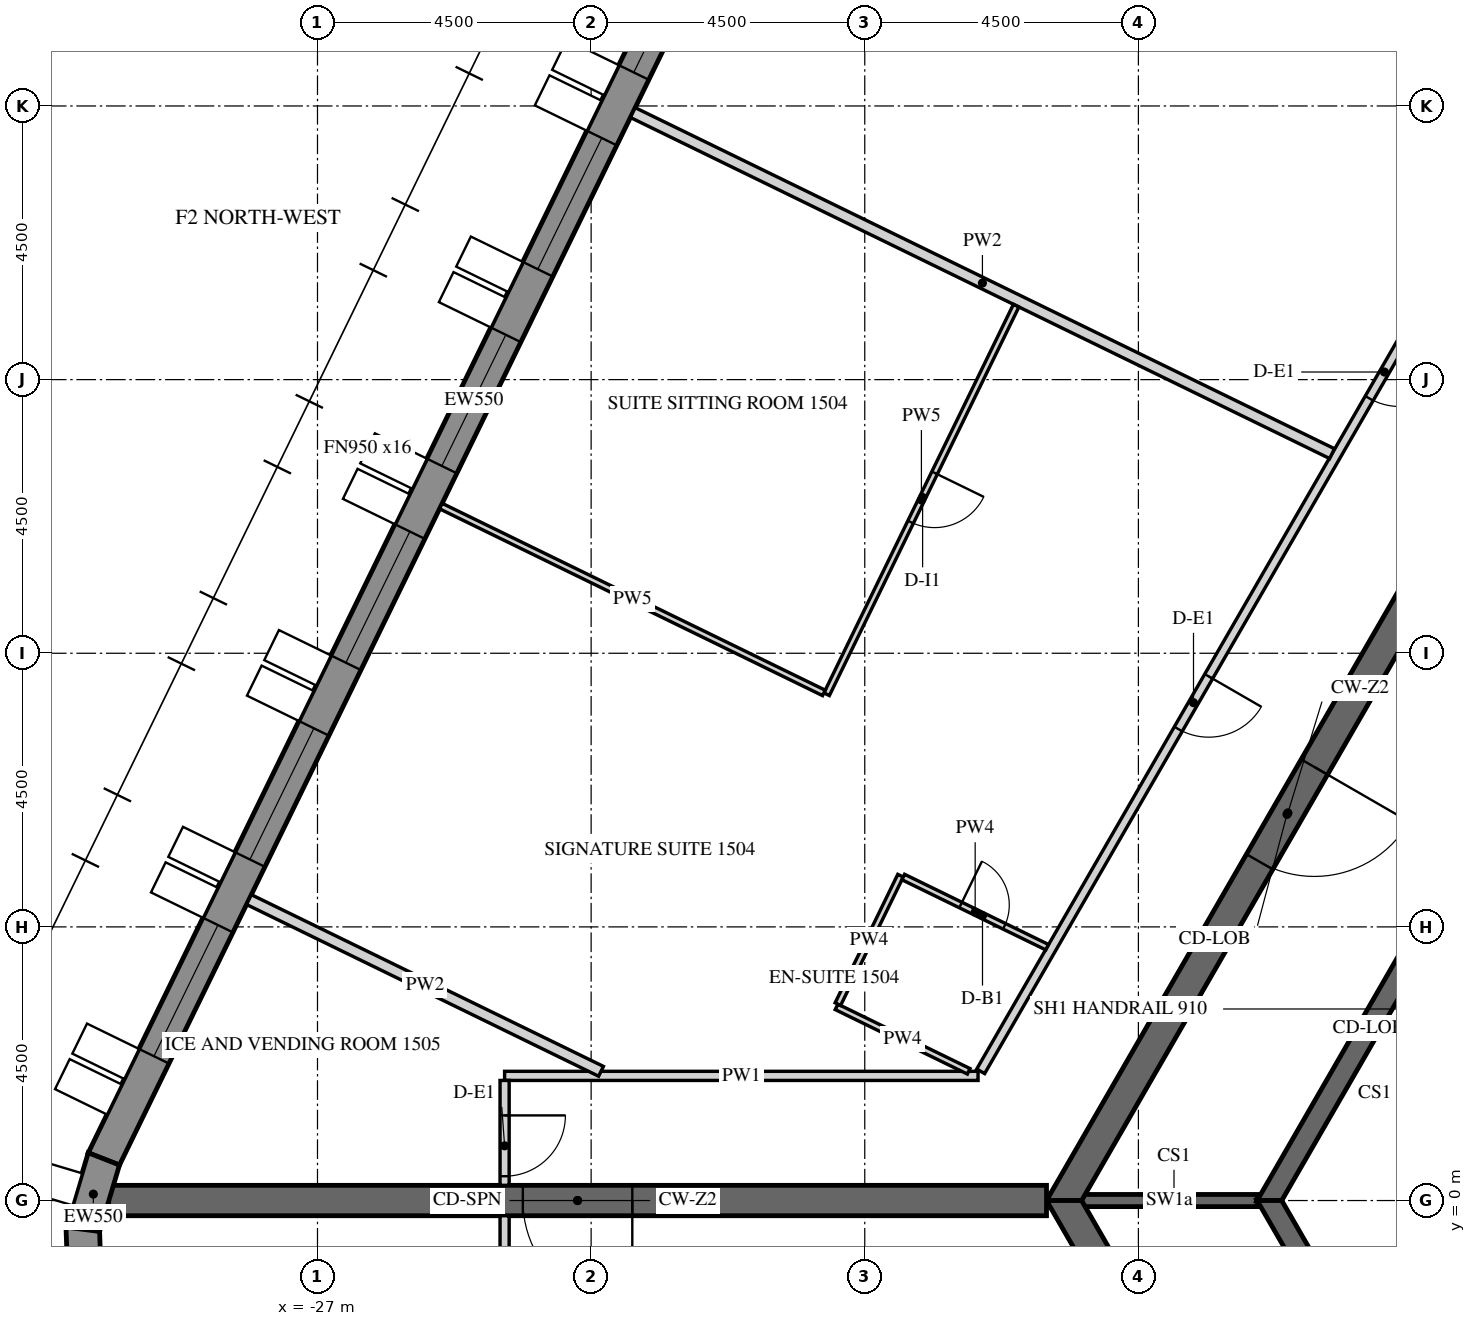
"""IFC4 building model, lengths in metres.
Left out: names, types, materials, properties, quantities, classifications, styles, units other than length and angle.
Written with IfcOpenShell. Run it as: python <this file> out.ifc"""

import sys

from ifc_helpers import new_model, si_unit, direction, frame, frame_2d, origin, place, context, subcontext, project, spatial, polyline, rectangle, outline, extrude, element, fill, save


model = new_model("IFC4")
c1 = context("Model", 3, precision=1e-05, world=origin(), true_north=direction((0.0, 1.0)))
c2 = subcontext(c1, "Body", "Model", "MODEL_VIEW")
j1 = project(units=[si_unit("LENGTHUNIT", "METRE"), si_unit("PLANEANGLEUNIT", "RADIAN")], contexts=[c1])
p1 = place(None, origin())
s1 = spatial("IfcSite", under=j1, at=p1, CompositionType="ELEMENT")
p2 = place(p1, origin())
s2 = spatial("IfcBuilding", under=s1, at=p2, CompositionType="ELEMENT")
p3 = place(p2, frame((0.0, 0.0, 195.6)))
s3 = spatial("IfcBuildingStorey", under=s2, at=p3, CompositionType="ELEMENT", Elevation=195.6)
p4 = place(p3, frame((-18.345, 25.633, -0.15), z_axis=(0.0, 0.0, 1.0), x_axis=(-0.43837181828, -0.898793718791, 0.0)))
e1 = element("IfcWall", 1, at=p4, inside=s3, PredefinedType="SOLIDWALL", context=c2, shape_type="SweptSolid", body=[
    extrude(outline(polyline([(-0.026, -0.275), (27.78, -0.275), (27.735, 0.275), (0.026, 0.275), (-0.026, -0.275)])), origin(), (0.0, 0.0, 1.0), 3.9),
])
p5 = place(p4, frame((1.879, 0.0, 1.05)))
e2 = element("IfcOpeningElement", 2, at=p5, cuts=e1, PredefinedType="OPENING", context=c2, shape_type="SweptSolid", body=[
    extrude(rectangle(XDim=2.4, YDim=2.4, at=frame_2d((1.2, 1.2))), frame((0.0, 0.285, 0.0), z_axis=(0.0, -1.0, 0.0), x_axis=(1.0, 0.0, 0.0)), (0.0, 0.0, 1.0), 0.57),
])
p6 = place(p4, frame((5.479, 0.0, 1.05)))
e3 = element("IfcOpeningElement", 3, at=p6, cuts=e1, PredefinedType="OPENING", context=c2, shape_type="SweptSolid", body=[
    extrude(rectangle(XDim=2.4, YDim=2.4, at=frame_2d((1.2, 1.2))), frame((0.0, 0.285, 0.0), z_axis=(0.0, -1.0, 0.0), x_axis=(1.0, 0.0, 0.0)), (0.0, 0.0, 1.0), 0.57),
])
p7 = place(p4, frame((9.079, 0.0, 1.05)))
e4 = element("IfcOpeningElement", 4, at=p7, cuts=e1, PredefinedType="OPENING", context=c2, shape_type="SweptSolid", body=[
    extrude(rectangle(XDim=2.4, YDim=2.4, at=frame_2d((1.2, 1.2))), frame((0.0, 0.285, 0.0), z_axis=(0.0, -1.0, 0.0), x_axis=(1.0, 0.0, 0.0)), (0.0, 0.0, 1.0), 0.57),
])
p8 = place(p4, frame((12.679, 0.0, 1.05)))
e5 = element("IfcOpeningElement", 5, at=p8, cuts=e1, PredefinedType="OPENING", context=c2, shape_type="SweptSolid", body=[
    extrude(rectangle(XDim=2.4, YDim=2.4, at=frame_2d((1.2, 1.2))), frame((0.0, 0.285, 0.0), z_axis=(0.0, -1.0, 0.0), x_axis=(1.0, 0.0, 0.0)), (0.0, 0.0, 1.0), 0.57),
])
p9 = place(p4, frame((16.279, 0.0, 1.05)))
e6 = element("IfcOpeningElement", 6, at=p9, cuts=e1, PredefinedType="OPENING", context=c2, shape_type="SweptSolid", body=[
    extrude(rectangle(XDim=2.4, YDim=2.4, at=frame_2d((1.2, 1.2))), frame((0.0, 0.285, 0.0), z_axis=(0.0, -1.0, 0.0), x_axis=(1.0, 0.0, 0.0)), (0.0, 0.0, 1.0), 0.57),
])
p10 = place(p4, frame((19.879, 0.0, 1.05)))
e7 = element("IfcOpeningElement", 7, at=p10, cuts=e1, PredefinedType="OPENING", context=c2, shape_type="SweptSolid", body=[
    extrude(rectangle(XDim=2.4, YDim=2.4, at=frame_2d((1.2, 1.2))), frame((0.0, 0.285, 0.0), z_axis=(0.0, -1.0, 0.0), x_axis=(1.0, 0.0, 0.0)), (0.0, 0.0, 1.0), 0.57),
])
p11 = place(p4, frame((23.479, 0.0, 1.05)))
e8 = element("IfcOpeningElement", 8, at=p11, cuts=e1, PredefinedType="OPENING", context=c2, shape_type="SweptSolid", body=[
    extrude(rectangle(XDim=2.4, YDim=2.4, at=frame_2d((1.2, 1.2))), frame((0.0, 0.285, 0.0), z_axis=(0.0, -1.0, 0.0), x_axis=(1.0, 0.0, 0.0)), (0.0, 0.0, 1.0), 0.57),
])
p12 = place(p3, frame((-30.513, 0.684, -0.15), z_axis=(0.0, 0.0, 1.0), x_axis=(-0.286736058109, -0.958009620505, 0.0)))
e9 = element("IfcWall", 9, at=p12, inside=s3, PredefinedType="SOLIDWALL", context=c2, shape_type="SweptSolid", body=[
    extrude(outline(polyline([(-0.022, -0.275), (1.253, -0.275), (1.163, 0.275), (0.022, 0.275), (-0.022, -0.275)])), origin(), (0.0, 0.0, 1.0), 3.9),
])
p13 = place(p3, frame((-30.86, -0.473, -0.15), z_axis=(0.0, 0.0, 1.0), x_axis=(0.03495638276, -0.999388838893, 0.0)))
e10 = element("IfcWall", 10, at=p13, inside=s3, PredefinedType="SOLIDWALL", context=c2, shape_type="SweptSolid", body=[
    extrude(outline(polyline([(-0.045, -0.275), (1.253, -0.275), (1.163, 0.275), (0.045, 0.275), (-0.045, -0.275)])), origin(), (0.0, 0.0, 1.0), 3.9),
])
p14 = place(p3, frame((-7.361, 12.75, -0.15), z_axis=(0.0, 0.0, 1.0), x_axis=(-0.50000571537, -0.866022103989, 0.0)))
e11 = element("IfcWall", 11, at=p14, inside=s3, PredefinedType="SHEAR", context=c2, shape_type="SweptSolid", body=[
    extrude(outline(polyline([(-0.144, -0.25), (14.867, -0.25), (14.578, 0.25), (0.144, 0.25), (-0.144, -0.25)])), origin(), (0.0, 0.0, 1.0), 3.9),
])
p15 = place(p14, frame((6.49, 0.0, 0.15)))
e12 = element("IfcOpeningElement", 12, at=p15, cuts=e11, PredefinedType="OPENING", context=c2, shape_type="SweptSolid", body=[
    extrude(rectangle(XDim=1.8, YDim=2.4, at=frame_2d((0.9, 1.2))), frame((0.0, 0.26, 0.0), z_axis=(0.0, -1.0, 0.0), x_axis=(1.0, 0.0, 0.0)), (0.0, 0.0, 1.0), 0.52),
])
p16 = place(p3, frame((-14.722, 0.0, -0.15), z_axis=(0.0, 0.0, 1.0), x_axis=(0.50000571537, -0.866022103989, 0.0)))
e13 = element("IfcWall", 13, at=p16, inside=s3, PredefinedType="SHEAR", context=c2, shape_type="SweptSolid", body=[
    extrude(outline(polyline([(-0.144, -0.25), (14.867, -0.25), (14.578, 0.25), (0.144, 0.25), (-0.144, -0.25)])), origin(), (0.0, 0.0, 1.0), 3.9),
])
p17 = place(p16, frame((6.432, 0.0, 0.15)))
e14 = element("IfcOpeningElement", 14, at=p17, cuts=e13, PredefinedType="OPENING", context=c2, shape_type="SweptSolid", body=[
    extrude(rectangle(XDim=1.8, YDim=2.4, at=frame_2d((0.9, 1.2))), frame((0.0, 0.26, 0.0), z_axis=(0.0, -1.0, 0.0), x_axis=(1.0, 0.0, 0.0)), (0.0, 0.0, 1.0), 0.52),
])
p18 = place(p3, frame((-15.011, 0.0, -0.15), z_axis=(0.0, 0.0, 1.0), x_axis=(-1.0, 0.0, 0.0)))
e15 = element("IfcWall", 15, at=p18, inside=s3, PredefinedType="SHEAR", context=c2, shape_type="SweptSolid", body=[
    extrude(rectangle(XDim=15.424, YDim=0.5, at=frame_2d((7.712, 0.0))), origin(), (0.0, 0.0, 1.0), 3.9),
])
p19 = place(p18, frame((6.812, 0.0, 0.15)))
e16 = element("IfcOpeningElement", 16, at=p19, cuts=e15, PredefinedType="OPENING", context=c2, shape_type="SweptSolid", body=[
    extrude(rectangle(XDim=1.8, YDim=2.4, at=frame_2d((0.9, 1.2))), frame((0.0, 0.26, 0.0), z_axis=(0.0, -1.0, 0.0), x_axis=(1.0, 0.0, 0.0)), (0.0, 0.0, 1.0), 0.52),
])
p20 = place(p3, frame((-5.673, 9.825, -0.15), z_axis=(0.0, 0.0, 1.0), x_axis=(-0.499995046907, -0.866028263435, 0.0)))
e17 = element("IfcWall", 17, at=p20, inside=s3, PredefinedType="SHEAR", context=c2, shape_type="SweptSolid", body=[
    extrude(outline(polyline([(-0.101, -0.175), (11.446, -0.175), (11.244, 0.175), (0.101, 0.175), (-0.101, -0.175)])), origin(), (0.0, 0.0, 1.0), 3.9),
])
p21 = place(p20, frame((4.801, 0.0, 0.15)))
e18 = element("IfcOpeningElement", 18, at=p21, cuts=e17, PredefinedType="OPENING", context=c2, shape_type="SweptSolid", body=[
    extrude(rectangle(XDim=1.8, YDim=2.4, at=frame_2d((0.9, 1.2))), frame((0.0, 0.185, 0.0), z_axis=(0.0, -1.0, 0.0), x_axis=(1.0, 0.0, 0.0)), (0.0, 0.0, 1.0), 0.37),
])
p22 = place(p3, frame((-11.345, 0.0, -0.15), z_axis=(0.0, 0.0, 1.0), x_axis=(0.499995046907, -0.866028263435, 0.0)))
e19 = element("IfcWall", 19, at=p22, inside=s3, PredefinedType="SHEAR", context=c2, shape_type="SweptSolid", body=[
    extrude(outline(polyline([(-0.101, -0.175), (11.446, -0.175), (11.244, 0.175), (0.101, 0.175), (-0.101, -0.175)])), origin(), (0.0, 0.0, 1.0), 3.9),
])
p23 = place(p22, frame((4.744, 0.0, 0.15)))
e20 = element("IfcOpeningElement", 20, at=p23, cuts=e19, PredefinedType="OPENING", context=c2, shape_type="SweptSolid", body=[
    extrude(rectangle(XDim=1.8, YDim=2.4, at=frame_2d((0.9, 1.2))), frame((0.0, 0.185, 0.0), z_axis=(0.0, -1.0, 0.0), x_axis=(1.0, 0.0, 0.0)), (0.0, 0.0, 1.0), 0.37),
])
p24 = place(p3, frame((-11.547, 0.0, -0.15), z_axis=(0.0, 0.0, 1.0), x_axis=(-1.0, 0.0, 0.0)))
e21 = element("IfcWall", 21, at=p24, inside=s3, PredefinedType="SHEAR", context=c2, shape_type="SweptSolid", body=[
    extrude(rectangle(XDim=2.887, YDim=0.2, at=frame_2d((1.443, 0.0))), origin(), (0.0, 0.0, 1.0), 3.9),
])
p25 = place(p3, frame((-8.704, 14.925, 0.0), z_axis=(0.0, 0.0, 1.0), x_axis=(-0.500001272756, -0.866024668957, 0.0)))
e22 = element("IfcWall", 22, at=p25, inside=s3, PredefinedType="PARTITIONING", context=c2, shape_type="SweptSolid", body=[
    extrude(rectangle(XDim=14.78, YDim=0.15, at=frame_2d((7.39, 0.0))), origin(), (0.0, 0.0, 1.0), 2.988),
])
p26 = place(p25, frame((1.001, 0.0, 0.0)))
e23 = element("IfcOpeningElement", 23, at=p26, cuts=e22, PredefinedType="OPENING", context=c2, shape_type="SweptSolid", body=[
    extrude(rectangle(XDim=1.0, YDim=2.1, at=frame_2d((0.5, 1.05))), frame((0.0, 0.085, 0.0), z_axis=(0.0, -1.0, 0.0), x_axis=(1.0, 0.0, 0.0)), (0.0, 0.0, 1.0), 0.17),
])
p27 = place(p25, frame((7.281, 0.0, 0.0)))
e24 = element("IfcOpeningElement", 24, at=p27, cuts=e22, PredefinedType="OPENING", context=c2, shape_type="SweptSolid", body=[
    extrude(rectangle(XDim=1.0, YDim=2.1, at=frame_2d((0.5, 1.05))), frame((0.0, 0.085, 0.0), z_axis=(0.0, -1.0, 0.0), x_axis=(1.0, 0.0, 0.0)), (0.0, 0.0, 1.0), 0.17),
])
p28 = place(p3, frame((-16.137, 2.05, 0.0), z_axis=(0.0, 0.0, 1.0), x_axis=(-1.0, 0.0, 0.0)))
e25 = element("IfcWall", 25, at=p28, inside=s3, PredefinedType="PARTITIONING", context=c2, shape_type="SweptSolid", body=[
    extrude(rectangle(XDim=7.786, YDim=0.15, at=frame_2d((3.893, 0.0))), origin(), (0.0, 0.0, 1.0), 2.988),
])
p29 = place(p3, frame((-23.923, 1.975, 0.0), z_axis=(0.0, 0.0, 1.0), x_axis=(0.0, -1.0, 0.0)))
e26 = element("IfcWall", 26, at=p29, inside=s3, PredefinedType="PARTITIONING", context=c2, shape_type="SweptSolid", body=[
    extrude(rectangle(XDim=1.725, YDim=0.15, at=frame_2d((0.863, 0.0))), origin(), (0.0, 0.0, 1.0), 2.988),
])
p30 = place(p29, frame((0.575, 0.0, 0.0)))
e27 = element("IfcOpeningElement", 27, at=p30, cuts=e26, PredefinedType="OPENING", context=c2, shape_type="SweptSolid", body=[
    extrude(rectangle(XDim=1.0, YDim=2.1, at=frame_2d((0.5, 1.05))), frame((0.0, 0.085, 0.0), z_axis=(0.0, -1.0, 0.0), x_axis=(1.0, 0.0, 0.0)), (0.0, 0.0, 1.0), 0.17),
])
p31 = place(p3, frame((-23.923, -0.25, 0.0), z_axis=(0.0, 0.0, 1.0), x_axis=(0.0, -1.0, 0.0)))
e28 = element("IfcWall", 28, at=p31, inside=s3, PredefinedType="PARTITIONING", context=c2, shape_type="SweptSolid", body=[
    extrude(rectangle(XDim=1.8, YDim=0.15, at=frame_2d((0.9, 0.0))), origin(), (0.0, 0.0, 1.0), 2.988),
])
p32 = place(p3, frame((-21.815, 17.892, 0.0), z_axis=(0.0, 0.0, 1.0), x_axis=(0.898799253997, -0.438360469265, 0.0)))
e29 = element("IfcWall", 29, at=p32, inside=s3, PredefinedType="PARTITIONING", context=c2, shape_type="SweptSolid", body=[
    extrude(rectangle(XDim=12.794, YDim=0.18, at=frame_2d((6.397, 0.0))), origin(), (0.0, 0.0, 1.0), 2.988),
])
p33 = place(p3, frame((-16.291, 2.125, 0.0), z_axis=(0.0, 0.0, 1.0), x_axis=(-0.898785911157, 0.438387825909, 0.0)))
e30 = element("IfcWall", 30, at=p33, inside=s3, PredefinedType="PARTITIONING", context=c2, shape_type="SweptSolid", body=[
    extrude(rectangle(XDim=2.418, YDim=0.1, at=frame_2d((1.209, 0.0))), origin(), (0.0, 0.0, 1.0), 2.988),
])
p34 = place(p3, frame((-18.442, 3.23, 0.0), z_axis=(0.0, 0.0, 1.0), x_axis=(0.438339704034, 0.898809381275, 0.0)))
e31 = element("IfcWall", 31, at=p34, inside=s3, PredefinedType="PARTITIONING", context=c2, shape_type="SweptSolid", body=[
    extrude(rectangle(XDim=2.35, YDim=0.1, at=frame_2d((1.175, 0.0))), origin(), (0.0, 0.0, 1.0), 2.988),
])
p35 = place(p3, frame((-17.367, 5.32, 0.0), z_axis=(0.0, 0.0, 1.0), x_axis=(0.898798752769, -0.438361496965, 0.0)))
e32 = element("IfcWall", 32, at=p35, inside=s3, PredefinedType="PARTITIONING", context=c2, shape_type="SweptSolid", body=[
    extrude(rectangle(XDim=2.632, YDim=0.1, at=frame_2d((1.316, 0.0))), origin(), (0.0, 0.0, 1.0), 2.988),
])
p36 = place(p35, frame((1.05, 0.0, 0.0)))
e33 = element("IfcOpeningElement", 33, at=p36, cuts=e32, PredefinedType="OPENING", context=c2, shape_type="SweptSolid", body=[
    extrude(rectangle(XDim=0.8, YDim=2.1, at=frame_2d((0.4, 1.05))), frame((0.0, 0.06, 0.0), z_axis=(0.0, -1.0, 0.0), x_axis=(1.0, 0.0, 0.0)), (0.0, 0.0, 1.0), 0.12),
])
p37 = place(p3, frame((-15.51, 14.717, 0.0), z_axis=(0.0, 0.0, 1.0), x_axis=(-0.438387776054, -0.898785935475, 0.0)))
e34 = element("IfcWall", 34, at=p37, inside=s3, PredefinedType="PARTITIONING", context=c2, shape_type="SweptSolid", body=[
    extrude(rectangle(XDim=7.11, YDim=0.1, at=frame_2d((3.555, 0.0))), origin(), (0.0, 0.0, 1.0), 2.988),
])
p38 = place(p37, frame((3.06, 0.0, 0.0)))
e35 = element("IfcOpeningElement", 35, at=p38, cuts=e34, PredefinedType="OPENING", context=c2, shape_type="SweptSolid", body=[
    extrude(rectangle(XDim=0.9, YDim=2.1, at=frame_2d((0.45, 1.05))), frame((0.0, 0.06, 0.0), z_axis=(0.0, -1.0, 0.0), x_axis=(1.0, 0.0, 0.0)), (0.0, 0.0, 1.0), 0.12),
])
p39 = place(p3, frame((-18.672, 8.348, 0.0), z_axis=(0.0, 0.0, 1.0), x_axis=(-0.898793888698, 0.438371469919, 0.0)))
e36 = element("IfcWall", 36, at=p39, inside=s3, PredefinedType="PARTITIONING", context=c2, shape_type="SweptSolid", body=[
    extrude(rectangle(XDim=7.008, YDim=0.1, at=frame_2d((3.504, 0.0))), origin(), (0.0, 0.0, 1.0), 2.988),
])
p40 = place(p3, frame((-28.127, 4.949, 0.0), z_axis=(0.0, 0.0, 1.0), x_axis=(0.898795032868, -0.438369124017, 0.0)))
e37 = element("IfcWall", 37, at=p40, inside=s3, PredefinedType="PARTITIONING", context=c2, shape_type="SweptSolid", body=[
    extrude(rectangle(XDim=6.442, YDim=0.18, at=frame_2d((3.221, 0.0))), origin(), (0.0, 0.0, 1.0), 2.988),
])
p41 = place(p6, frame((0.0, 0.205, 0.0)))
e38 = element("IfcWindow", 38, at=p41, inside=s3, PartitioningType="DOUBLE_PANEL_VERTICAL", PredefinedType="WINDOW", context=c2, shape_type="SweptSolid", body=[
    extrude(rectangle(XDim=2.4, YDim=2.4, at=frame_2d((1.2, 1.2))), frame((0.0, 0.03, 0.0), z_axis=(0.0, -1.0, 0.0), x_axis=(1.0, 0.0, 0.0)), (0.0, 0.0, 1.0), 0.06),
])
fill(e3, e38)
p42 = place(p7, frame((0.0, 0.205, 0.0)))
e39 = element("IfcWindow", 39, at=p42, inside=s3, PartitioningType="DOUBLE_PANEL_VERTICAL", PredefinedType="WINDOW", context=c2, shape_type="SweptSolid", body=[
    extrude(rectangle(XDim=2.4, YDim=2.4, at=frame_2d((1.2, 1.2))), frame((0.0, 0.03, 0.0), z_axis=(0.0, -1.0, 0.0), x_axis=(1.0, 0.0, 0.0)), (0.0, 0.0, 1.0), 0.06),
])
fill(e4, e39)
p43 = place(p8, frame((0.0, 0.205, 0.0)))
e40 = element("IfcWindow", 40, at=p43, inside=s3, PartitioningType="DOUBLE_PANEL_VERTICAL", PredefinedType="WINDOW", context=c2, shape_type="SweptSolid", body=[
    extrude(rectangle(XDim=2.4, YDim=2.4, at=frame_2d((1.2, 1.2))), frame((0.0, 0.03, 0.0), z_axis=(0.0, -1.0, 0.0), x_axis=(1.0, 0.0, 0.0)), (0.0, 0.0, 1.0), 0.06),
])
fill(e5, e40)
p44 = place(p9, frame((0.0, 0.205, 0.0)))
e41 = element("IfcWindow", 41, at=p44, inside=s3, PartitioningType="DOUBLE_PANEL_VERTICAL", PredefinedType="WINDOW", context=c2, shape_type="SweptSolid", body=[
    extrude(rectangle(XDim=2.4, YDim=2.4, at=frame_2d((1.2, 1.2))), frame((0.0, 0.03, 0.0), z_axis=(0.0, -1.0, 0.0), x_axis=(1.0, 0.0, 0.0)), (0.0, 0.0, 1.0), 0.06),
])
fill(e6, e41)
p45 = place(p10, frame((0.0, 0.205, 0.0)))
e42 = element("IfcWindow", 42, at=p45, inside=s3, PartitioningType="DOUBLE_PANEL_VERTICAL", PredefinedType="WINDOW", context=c2, shape_type="SweptSolid", body=[
    extrude(rectangle(XDim=2.4, YDim=2.4, at=frame_2d((1.2, 1.2))), frame((0.0, 0.03, 0.0), z_axis=(0.0, -1.0, 0.0), x_axis=(1.0, 0.0, 0.0)), (0.0, 0.0, 1.0), 0.06),
])
fill(e7, e42)
p46 = place(p11, frame((0.0, 0.205, 0.0)))
e43 = element("IfcWindow", 43, at=p46, inside=s3, PartitioningType="DOUBLE_PANEL_VERTICAL", PredefinedType="WINDOW", context=c2, shape_type="SweptSolid", body=[
    extrude(rectangle(XDim=2.4, YDim=2.4, at=frame_2d((1.2, 1.2))), frame((0.0, 0.03, 0.0), z_axis=(0.0, -1.0, 0.0), x_axis=(1.0, 0.0, 0.0)), (0.0, 0.0, 1.0), 0.06),
])
fill(e8, e43)
p47 = place(p15, origin())
e44 = element("IfcDoor", 44, at=p47, inside=s3, OperationType="DOUBLE_DOOR_SINGLE_SWING", PredefinedType="DOOR", context=c2, shape_type="SweptSolid", body=[
    extrude(rectangle(XDim=1.8, YDim=2.4, at=frame_2d((0.9, 1.2))), frame((0.0, 0.025, 0.0), z_axis=(0.0, -1.0, 0.0), x_axis=(1.0, 0.0, 0.0)), (0.0, 0.0, 1.0), 0.05),
])
fill(e12, e44)
p48 = place(p19, origin())
e45 = element("IfcDoor", 45, at=p48, inside=s3, OperationType="DOUBLE_DOOR_SINGLE_SWING", PredefinedType="DOOR", context=c2, shape_type="SweptSolid", body=[
    extrude(rectangle(XDim=1.8, YDim=2.4, at=frame_2d((0.9, 1.2))), frame((0.0, 0.025, 0.0), z_axis=(0.0, -1.0, 0.0), x_axis=(1.0, 0.0, 0.0)), (0.0, 0.0, 1.0), 0.05),
])
fill(e16, e45)
p49 = place(p26, origin())
e46 = element("IfcDoor", 46, at=p49, inside=s3, OperationType="SINGLE_SWING_RIGHT", PredefinedType="DOOR", context=c2, shape_type="SweptSolid", body=[
    extrude(rectangle(XDim=1.0, YDim=2.1, at=frame_2d((0.5, 1.05))), frame((0.0, 0.025, 0.0), z_axis=(0.0, -1.0, 0.0), x_axis=(1.0, 0.0, 0.0)), (0.0, 0.0, 1.0), 0.05),
])
fill(e23, e46)
p50 = place(p27, origin())
e47 = element("IfcDoor", 47, at=p50, inside=s3, OperationType="SINGLE_SWING_RIGHT", PredefinedType="DOOR", context=c2, shape_type="SweptSolid", body=[
    extrude(rectangle(XDim=1.0, YDim=2.1, at=frame_2d((0.5, 1.05))), frame((0.0, 0.025, 0.0), z_axis=(0.0, -1.0, 0.0), x_axis=(1.0, 0.0, 0.0)), (0.0, 0.0, 1.0), 0.05),
])
fill(e24, e47)
p51 = place(p36, origin())
e48 = element("IfcDoor", 48, at=p51, inside=s3, OperationType="SINGLE_SWING_LEFT", PredefinedType="DOOR", context=c2, shape_type="SweptSolid", body=[
    extrude(rectangle(XDim=0.8, YDim=2.1, at=frame_2d((0.4, 1.05))), frame((0.0, 0.025, 0.0), z_axis=(0.0, -1.0, 0.0), x_axis=(1.0, 0.0, 0.0)), (0.0, 0.0, 1.0), 0.05),
])
fill(e33, e48)
p52 = place(p38, origin())
e49 = element("IfcDoor", 49, at=p52, inside=s3, OperationType="SINGLE_SWING_RIGHT", PredefinedType="DOOR", context=c2, shape_type="SweptSolid", body=[
    extrude(rectangle(XDim=0.9, YDim=2.1, at=frame_2d((0.45, 1.05))), frame((0.0, 0.025, 0.0), z_axis=(0.0, -1.0, 0.0), x_axis=(1.0, 0.0, 0.0)), (0.0, 0.0, 1.0), 0.05),
])
fill(e35, e49)
p53 = place(p30, origin())
e50 = element("IfcDoor", 50, at=p53, inside=s3, OperationType="SINGLE_SWING_LEFT", PredefinedType="DOOR", context=c2, shape_type="SweptSolid", body=[
    extrude(rectangle(XDim=1.0, YDim=2.1, at=frame_2d((0.5, 1.05))), frame((0.0, 0.025, 0.0), z_axis=(0.0, -1.0, 0.0), x_axis=(1.0, 0.0, 0.0)), (0.0, 0.0, 1.0), 0.05),
])
fill(e27, e50)
save(model, sys.argv[1])
